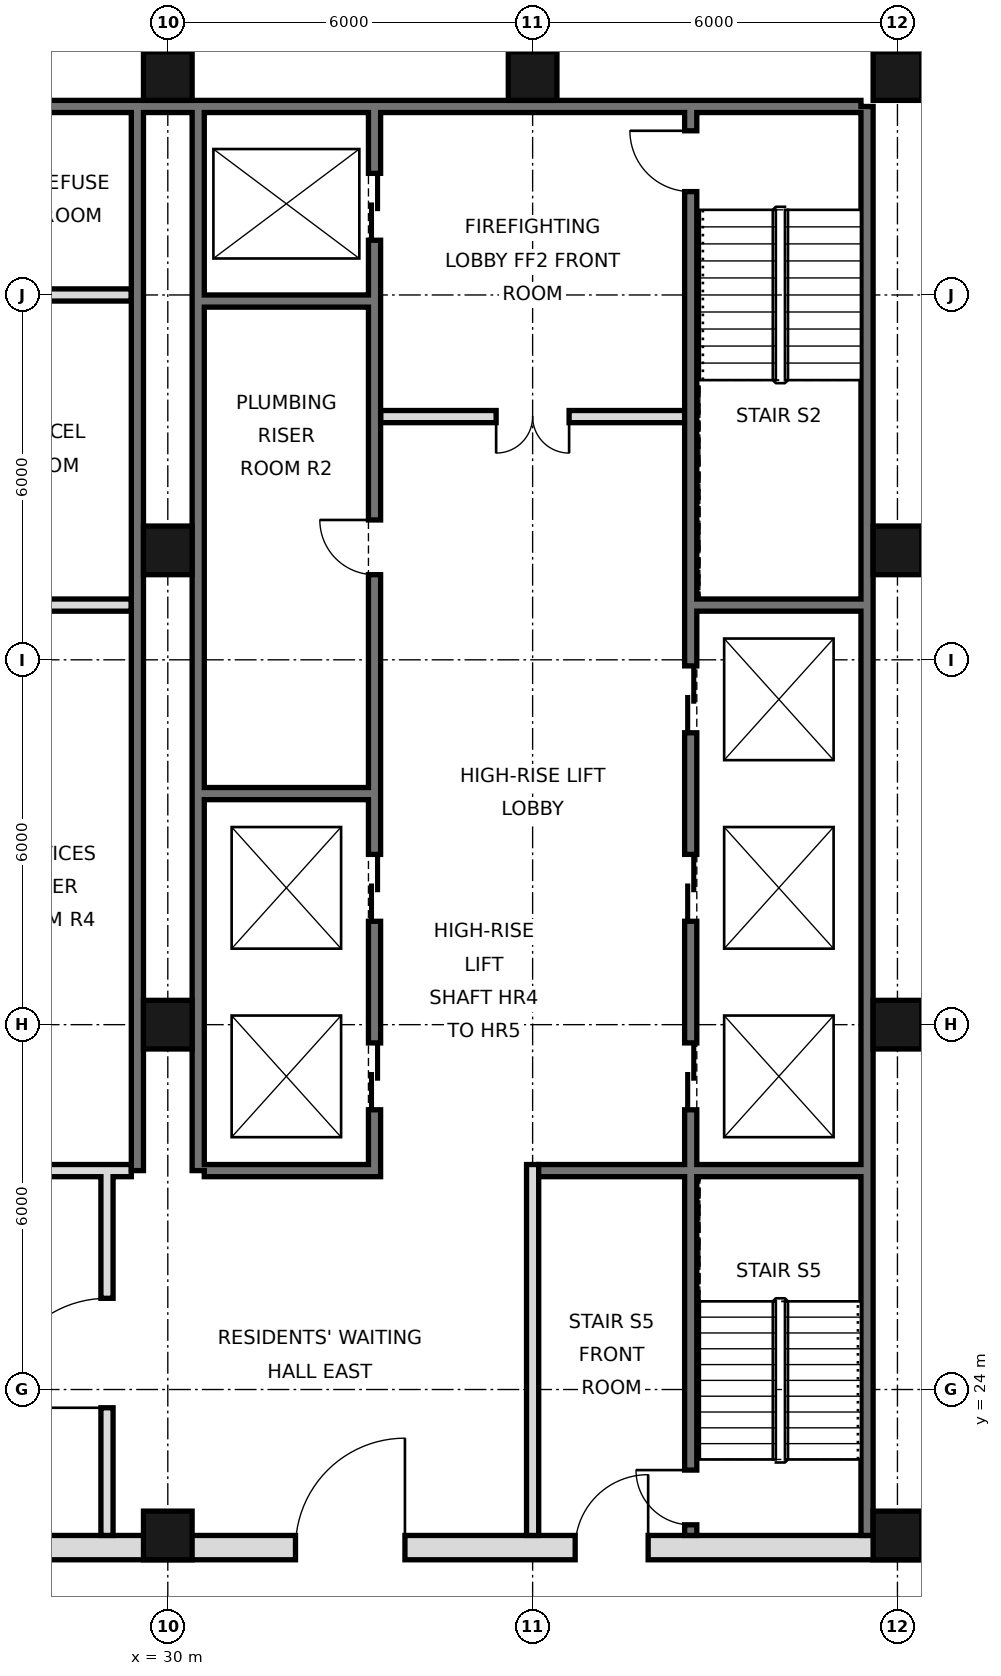
"""IFC4 building model, lengths in metres.
Left out: names, types, materials, properties, quantities, classifications, styles, units other than length and angle.
Written with IfcOpenShell. Run it as: python <this file> out.ifc"""

import sys

from ifc_helpers import new_model, si_unit, direction, frame, frame_2d, origin, origin_2d, place, context, subcontext, project, spatial, rectangle, hollow_rectangle, extrude, element, fill, save


model = new_model("IFC4")
c1 = context("Model", 3, precision=1e-05, world=origin(), true_north=direction((0.0, 1.0)))
c2 = subcontext(c1, "Body", "Model", "MODEL_VIEW")
j1 = project(units=[si_unit("LENGTHUNIT", "METRE"), si_unit("PLANEANGLEUNIT", "RADIAN")], contexts=[c1])
p1 = place(None, origin())
s1 = spatial("IfcSite", under=j1, at=p1, CompositionType="ELEMENT")
p2 = place(p1, origin())
s2 = spatial("IfcBuilding", under=s1, at=p2, CompositionType="ELEMENT")
p3 = place(p2, frame((0.0, 0.0, 312.4)))
s3 = spatial("IfcBuildingStorey", under=s2, at=p3, CompositionType="ELEMENT", Elevation=312.4)
for number, where, z_axis, x_axis in (
    (1, (30.0, 21.6, 0.0), (0.0, 0.0, 1.0), (1.0, 0.0, 0.0)),
    (2, (30.0, 30.0, 0.0), (0.0, 0.0, 1.0), (1.0, 0.0, 0.0)),
    (3, (30.0, 37.8, 0.0), (0.0, 0.0, 1.0), (1.0, 0.0, 0.0)),
    (4, (30.0, 45.6, 0.0), (0.0, 0.0, 1.0), (1.0, 0.0, 0.0)),
    (5, (36.0, 45.6, 0.0), (0.0, 0.0, 1.0), (1.0, 0.0, 0.0)),
    (6, (42.0, 21.6, 0.0), (0.0, 0.0, 1.0), (1.0, 0.0, 0.0)),
    (7, (42.0, 30.0, 0.0), (0.0, 0.0, 1.0), (1.0, 0.0, 0.0)),
    (8, (42.0, 37.8, 0.0), (0.0, 0.0, 1.0), (1.0, 0.0, 0.0)),
    (9, (42.0, 45.6, 0.0), (0.0, 0.0, 1.0), (1.0, 0.0, 0.0)),
):
    element("IfcColumn", number, at=place(p3, frame(where, z_axis=z_axis, x_axis=x_axis)), inside=s3, PredefinedType="COLUMN", context=c2, shape_type="SweptSolid", body=[
        extrude(hollow_rectangle(XDim=0.8, YDim=0.8, WallThickness=0.025, at=origin_2d()), origin(), (0.0, 0.0, 1.0), 3.6),
    ])
p4 = place(p3, frame((41.5, 21.6, 0.0), z_axis=(0.0, 0.0, 1.0), x_axis=(0.0, 1.0, 0.0)))
e10 = element("IfcWall", 10, at=p4, inside=s3, PredefinedType="SOLIDWALL", context=c2, shape_type="SweptSolid", body=[
    extrude(rectangle(XDim=23.5, YDim=0.2, at=frame_2d((11.75, 0.0))), origin(), (0.0, 0.0, 1.0), 3.42),
])
p5 = place(p3, frame((6.6, 45.1, 0.0), z_axis=(0.0, 0.0, 1.0), x_axis=(1.0, 0.0, 0.0)))
e11 = element("IfcWall", 11, at=p5, inside=s3, PredefinedType="SOLIDWALL", context=c2, shape_type="SweptSolid", body=[
    extrude(rectangle(XDim=34.8, YDim=0.2, at=frame_2d((17.4, 0.0))), origin(), (0.0, 0.0, 1.0), 3.42),
])
for number, where, z_axis, x_axis in (
    (12, (29.5, 27.6, 0.0), (0.0, 0.0, 1.0), (0.0, 1.0, 0.0)),
    (13, (30.5, 27.6, 0.0), (0.0, 0.0, 1.0), (0.0, 1.0, 0.0)),
):
    element("IfcWall", number, at=place(p3, frame(where, z_axis=z_axis, x_axis=x_axis)), inside=s3, PredefinedType="SOLIDWALL", context=c2, shape_type="SweptSolid", body=[
        extrude(rectangle(XDim=17.5, YDim=0.2, at=frame_2d((8.75, 0.0))), origin(), (0.0, 0.0, 1.0), 3.42),
    ])
p6 = place(p3, frame((5.6, 21.4, 0.0), z_axis=(0.0, 0.0, 1.0), x_axis=(1.0, 0.0, 0.0)))
e14 = element("IfcWall", 14, at=p6, inside=s3, PredefinedType="SOLIDWALL", context=c2, shape_type="SweptSolid", body=[
    extrude(rectangle(XDim=36.8, YDim=0.4, at=frame_2d((18.4, 0.0))), origin(), (0.0, 0.0, 1.0), 3.42),
])
p7 = place(p6, frame((8.5, 0.0, 0.0)))
e15 = element("IfcOpeningElement", 15, at=p7, cuts=e14, PredefinedType="OPENING", context=c2, shape_type="SweptSolid", body=[
    extrude(rectangle(XDim=1.8, YDim=2.1, at=frame_2d((0.9, 1.05))), frame((0.0, 0.21, 0.0), z_axis=(0.0, -1.0, 0.0), x_axis=(1.0, 0.0, 0.0)), (0.0, 0.0, 1.0), 0.42),
])
p8 = place(p6, frame((17.5, 0.0, 0.0)))
e16 = element("IfcOpeningElement", 16, at=p8, cuts=e14, PredefinedType="OPENING", context=c2, shape_type="SweptSolid", body=[
    extrude(rectangle(XDim=1.8, YDim=2.1, at=frame_2d((0.9, 1.05))), frame((0.0, 0.21, 0.0), z_axis=(0.0, -1.0, 0.0), x_axis=(1.0, 0.0, 0.0)), (0.0, 0.0, 1.0), 0.42),
])
p9 = place(p6, frame((26.5, 0.0, 0.0)))
e17 = element("IfcOpeningElement", 17, at=p9, cuts=e14, PredefinedType="OPENING", context=c2, shape_type="SweptSolid", body=[
    extrude(rectangle(XDim=1.8, YDim=2.1, at=frame_2d((0.9, 1.05))), frame((0.0, 0.21, 0.0), z_axis=(0.0, -1.0, 0.0), x_axis=(1.0, 0.0, 0.0)), (0.0, 0.0, 1.0), 0.42),
])
p10 = place(p6, frame((4.5, 0.0, 0.0)))
e18 = element("IfcOpeningElement", 18, at=p10, cuts=e14, PredefinedType="OPENING", context=c2, shape_type="SweptSolid", body=[
    extrude(rectangle(XDim=1.2, YDim=2.1, at=frame_2d((0.6, 1.05))), frame((0.0, 0.21, 0.0), z_axis=(0.0, -1.0, 0.0), x_axis=(1.0, 0.0, 0.0)), (0.0, 0.0, 1.0), 0.42),
])
p11 = place(p6, frame((31.1, 0.0, 0.0)))
e19 = element("IfcOpeningElement", 19, at=p11, cuts=e14, PredefinedType="OPENING", context=c2, shape_type="SweptSolid", body=[
    extrude(rectangle(XDim=1.2, YDim=2.1, at=frame_2d((0.6, 1.05))), frame((0.0, 0.21, 0.0), z_axis=(0.0, -1.0, 0.0), x_axis=(1.0, 0.0, 0.0)), (0.0, 0.0, 1.0), 0.42),
])
p12 = place(p3, frame((29.0, 21.6, 0.0), z_axis=(0.0, 0.0, 1.0), x_axis=(0.0, 1.0, 0.0)))
e20 = element("IfcWall", 20, at=p12, inside=s3, PredefinedType="PARTITIONING", context=c2, shape_type="SweptSolid", body=[
    extrude(rectangle(XDim=6.0, YDim=0.2, at=frame_2d((3.0, 0.0))), origin(), (0.0, 0.0, 1.0), 3.42),
])
p13 = place(p12, frame((2.1, 0.0, 0.0)))
e21 = element("IfcOpeningElement", 21, at=p13, cuts=e20, PredefinedType="OPENING", context=c2, shape_type="SweptSolid", body=[
    extrude(rectangle(XDim=1.8, YDim=2.1, at=frame_2d((0.9, 1.05))), frame((0.0, 0.11, 0.0), z_axis=(0.0, -1.0, 0.0), x_axis=(1.0, 0.0, 0.0)), (0.0, 0.0, 1.0), 0.22),
])
p14 = place(p3, frame((33.4, 27.5, 0.0), z_axis=(0.0, 0.0, 1.0), x_axis=(0.0, 1.0, 0.0)))
e22 = element("IfcWall", 22, at=p14, inside=s3, PredefinedType="SOLIDWALL", context=c2, shape_type="SweptSolid", body=[
    extrude(rectangle(XDim=17.5, YDim=0.2, at=frame_2d((8.75, 0.0))), origin(), (0.0, 0.0, 1.0), 3.42),
])
p15 = place(p14, frame((1.1, 0.0, 0.0)))
e23 = element("IfcOpeningElement", 23, at=p15, cuts=e22, PredefinedType="OPENING", context=c2, shape_type="SweptSolid", body=[
    extrude(rectangle(XDim=1.1, YDim=2.1, at=frame_2d((0.55, 1.05))), frame((0.0, 0.11, 0.0), z_axis=(0.0, -1.0, 0.0), x_axis=(1.0, 0.0, 0.0)), (0.0, 0.0, 1.0), 0.22),
])
p16 = place(p14, frame((4.2, 0.0, 0.0)))
e24 = element("IfcOpeningElement", 24, at=p16, cuts=e22, PredefinedType="OPENING", context=c2, shape_type="SweptSolid", body=[
    extrude(rectangle(XDim=1.1, YDim=2.1, at=frame_2d((0.55, 1.05))), frame((0.0, 0.11, 0.0), z_axis=(0.0, -1.0, 0.0), x_axis=(1.0, 0.0, 0.0)), (0.0, 0.0, 1.0), 0.22),
])
p17 = place(p14, frame((15.4, 0.0, 0.0)))
e25 = element("IfcOpeningElement", 25, at=p17, cuts=e22, PredefinedType="OPENING", context=c2, shape_type="SweptSolid", body=[
    extrude(rectangle(XDim=1.1, YDim=2.1, at=frame_2d((0.55, 1.05))), frame((0.0, 0.11, 0.0), z_axis=(0.0, -1.0, 0.0), x_axis=(1.0, 0.0, 0.0)), (0.0, 0.0, 1.0), 0.22),
])
p18 = place(p14, frame((9.9, 0.0, 0.0)))
e26 = element("IfcOpeningElement", 26, at=p18, cuts=e22, PredefinedType="OPENING", context=c2, shape_type="SweptSolid", body=[
    extrude(rectangle(XDim=0.9, YDim=2.1, at=frame_2d((0.45, 1.05))), frame((0.0, 0.11, 0.0), z_axis=(0.0, -1.0, 0.0), x_axis=(1.0, 0.0, 0.0)), (0.0, 0.0, 1.0), 0.22),
])
p19 = place(p3, frame((36.0, 21.6, 0.0), z_axis=(0.0, 0.0, 1.0), x_axis=(0.0, 1.0, 0.0)))
e27 = element("IfcWall", 27, at=p19, inside=s3, PredefinedType="PARTITIONING", context=c2, shape_type="SweptSolid", body=[
    extrude(rectangle(XDim=6.1, YDim=0.2, at=frame_2d((3.05, 0.0))), origin(), (0.0, 0.0, 1.0), 3.42),
])
p20 = place(p3, frame((38.6, 21.6, 0.0), z_axis=(0.0, 0.0, 1.0), x_axis=(0.0, 1.0, 0.0)))
e28 = element("IfcWall", 28, at=p20, inside=s3, PredefinedType="SOLIDWALL", context=c2, shape_type="SweptSolid", body=[
    extrude(rectangle(XDim=23.4, YDim=0.2, at=frame_2d((11.7, 0.0))), origin(), (0.0, 0.0, 1.0), 3.42),
])
p21 = place(p20, frame((7.0, 0.0, 0.0)))
e29 = element("IfcOpeningElement", 29, at=p21, cuts=e28, PredefinedType="OPENING", context=c2, shape_type="SweptSolid", body=[
    extrude(rectangle(XDim=1.1, YDim=2.1, at=frame_2d((0.55, 1.05))), frame((0.0, 0.11, 0.0), z_axis=(0.0, -1.0, 0.0), x_axis=(1.0, 0.0, 0.0)), (0.0, 0.0, 1.0), 0.22),
])
p22 = place(p20, frame((10.1, 0.0, 0.0)))
e30 = element("IfcOpeningElement", 30, at=p22, cuts=e28, PredefinedType="OPENING", context=c2, shape_type="SweptSolid", body=[
    extrude(rectangle(XDim=1.1, YDim=2.1, at=frame_2d((0.55, 1.05))), frame((0.0, 0.11, 0.0), z_axis=(0.0, -1.0, 0.0), x_axis=(1.0, 0.0, 0.0)), (0.0, 0.0, 1.0), 0.22),
])
p23 = place(p20, frame((13.2, 0.0, 0.0)))
e31 = element("IfcOpeningElement", 31, at=p23, cuts=e28, PredefinedType="OPENING", context=c2, shape_type="SweptSolid", body=[
    extrude(rectangle(XDim=1.1, YDim=2.1, at=frame_2d((0.55, 1.05))), frame((0.0, 0.11, 0.0), z_axis=(0.0, -1.0, 0.0), x_axis=(1.0, 0.0, 0.0)), (0.0, 0.0, 1.0), 0.22),
])
p24 = place(p20, frame((22.1, 0.0, 0.0)))
e32 = element("IfcOpeningElement", 32, at=p24, cuts=e28, PredefinedType="OPENING", context=c2, shape_type="SweptSolid", body=[
    extrude(rectangle(XDim=1.0, YDim=2.1, at=frame_2d((0.5, 1.05))), frame((0.0, 0.11, 0.0), z_axis=(0.0, -1.0, 0.0), x_axis=(1.0, 0.0, 0.0)), (0.0, 0.0, 1.0), 0.22),
])
p25 = place(p20, frame((0.175, 0.0, 0.0)))
e33 = element("IfcOpeningElement", 33, at=p25, cuts=e28, PredefinedType="OPENING", context=c2, shape_type="SweptSolid", body=[
    extrude(rectangle(XDim=0.9, YDim=2.1, at=frame_2d((0.45, 1.05))), frame((0.0, 0.11, 0.0), z_axis=(0.0, -1.0, 0.0), x_axis=(1.0, 0.0, 0.0)), (0.0, 0.0, 1.0), 0.22),
])
for number, where, z_axis, x_axis in (
    (34, (26.7, 27.6, 0.0), (0.0, 0.0, 1.0), (1.0, 0.0, 0.0)),
    (35, (30.6, 27.6, 0.0), (0.0, 0.0, 1.0), (1.0, 0.0, 0.0)),
):
    element("IfcWall", number, at=place(p3, frame(where, z_axis=z_axis, x_axis=x_axis)), inside=s3, PredefinedType="SOLIDWALL", context=c2, shape_type="SweptSolid", body=[
        extrude(rectangle(XDim=2.7, YDim=0.2, at=frame_2d((1.35, 0.0))), origin(), (0.0, 0.0, 1.0), 3.42),
    ])
p26 = place(p3, frame((36.1, 27.6, 0.0), z_axis=(0.0, 0.0, 1.0), x_axis=(1.0, 0.0, 0.0)))
e36 = element("IfcWall", 36, at=p26, inside=s3, PredefinedType="SOLIDWALL", context=c2, shape_type="SweptSolid", body=[
    extrude(rectangle(XDim=5.3, YDim=0.2, at=frame_2d((2.65, 0.0))), origin(), (0.0, 0.0, 1.0), 3.42),
])
for number, where, z_axis, x_axis in (
    (37, (30.6, 33.8, 0.0), (0.0, 0.0, 1.0), (1.0, 0.0, 0.0)),
    (38, (26.7, 36.9, 0.0), (0.0, 0.0, 1.0), (1.0, 0.0, 0.0)),
    (39, (38.7, 36.9, 0.0), (0.0, 0.0, 1.0), (1.0, 0.0, 0.0)),
):
    element("IfcWall", number, at=place(p3, frame(where, z_axis=z_axis, x_axis=x_axis)), inside=s3, PredefinedType="SOLIDWALL", context=c2, shape_type="SweptSolid", body=[
        extrude(rectangle(XDim=2.7, YDim=0.2, at=frame_2d((1.35, 0.0))), origin(), (0.0, 0.0, 1.0), 3.42),
    ])
p27 = place(p3, frame((33.5, 40.0, 0.0), z_axis=(0.0, 0.0, 1.0), x_axis=(1.0, 0.0, 0.0)))
e40 = element("IfcWall", 40, at=p27, inside=s3, PredefinedType="PARTITIONING", context=c2, shape_type="SweptSolid", body=[
    extrude(rectangle(XDim=5.0, YDim=0.2, at=frame_2d((2.5, 0.0))), origin(), (0.0, 0.0, 1.0), 3.42),
])
p28 = place(p27, frame((1.9, 0.0, 0.0)))
e41 = element("IfcOpeningElement", 41, at=p28, cuts=e40, PredefinedType="OPENING", context=c2, shape_type="SweptSolid", body=[
    extrude(rectangle(XDim=1.2, YDim=2.1, at=frame_2d((0.6, 1.05))), frame((0.0, 0.11, 0.0), z_axis=(0.0, -1.0, 0.0), x_axis=(1.0, 0.0, 0.0)), (0.0, 0.0, 1.0), 0.22),
])
p29 = place(p3, frame((30.6, 41.9, 0.0), z_axis=(0.0, 0.0, 1.0), x_axis=(1.0, 0.0, 0.0)))
e42 = element("IfcWall", 42, at=p29, inside=s3, PredefinedType="SOLIDWALL", context=c2, shape_type="SweptSolid", body=[
    extrude(rectangle(XDim=2.7, YDim=0.2, at=frame_2d((1.35, 0.0))), origin(), (0.0, 0.0, 1.0), 3.42),
])
p30 = place(p3, frame((26.7, 42.0, 0.0), z_axis=(0.0, 0.0, 1.0), x_axis=(1.0, 0.0, 0.0)))
e43 = element("IfcWall", 43, at=p30, inside=s3, PredefinedType="PARTITIONING", context=c2, shape_type="SweptSolid", body=[
    extrude(rectangle(XDim=2.7, YDim=0.2, at=frame_2d((1.35, 0.0))), origin(), (0.0, 0.0, 1.0), 3.42),
])
p31 = place(p13, origin())
e44 = element("IfcDoor", 44, at=p31, inside=s3, OperationType="SINGLE_SWING_LEFT", PredefinedType="DOOR", context=c2, shape_type="SweptSolid", body=[
    extrude(rectangle(XDim=1.8, YDim=2.1, at=frame_2d((0.9, 1.05))), frame((0.0, 0.025, 0.0), z_axis=(0.0, -1.0, 0.0), x_axis=(1.0, 0.0, 0.0)), (0.0, 0.0, 1.0), 0.05),
])
fill(e21, e44)
p32 = place(p9, frame((1.8, 0.0, 0.0), z_axis=(0.0, 0.0, 1.0), x_axis=(-1.0, 0.0, 0.0)))
e45 = element("IfcDoor", 45, at=p32, inside=s3, OperationType="SINGLE_SWING_LEFT", PredefinedType="DOOR", context=c2, shape_type="SweptSolid", body=[
    extrude(rectangle(XDim=1.8, YDim=2.1, at=frame_2d((0.9, 1.05))), frame((0.0, 0.025, 0.0), z_axis=(0.0, -1.0, 0.0), x_axis=(1.0, 0.0, 0.0)), (0.0, 0.0, 1.0), 0.05),
])
fill(e17, e45)
p33 = place(p11, frame((1.2, 0.0, 0.0), z_axis=(0.0, 0.0, 1.0), x_axis=(-1.0, 0.0, 0.0)))
e46 = element("IfcDoor", 46, at=p33, inside=s3, OperationType="SINGLE_SWING_LEFT", PredefinedType="DOOR", context=c2, shape_type="SweptSolid", body=[
    extrude(rectangle(XDim=1.2, YDim=2.1, at=frame_2d((0.6, 1.05))), frame((0.0, 0.025, 0.0), z_axis=(0.0, -1.0, 0.0), x_axis=(1.0, 0.0, 0.0)), (0.0, 0.0, 1.0), 0.05),
])
fill(e19, e46)
p34 = place(p28, frame((1.2, 0.0, 0.0), z_axis=(0.0, 0.0, 1.0), x_axis=(-1.0, 0.0, 0.0)))
e47 = element("IfcDoor", 47, at=p34, inside=s3, OperationType="DOUBLE_DOOR_SINGLE_SWING", PredefinedType="DOOR", context=c2, shape_type="SweptSolid", body=[
    extrude(rectangle(XDim=1.2, YDim=2.1, at=frame_2d((0.6, 1.05))), frame((0.0, 0.025, 0.0), z_axis=(0.0, -1.0, 0.0), x_axis=(1.0, 0.0, 0.0)), (0.0, 0.0, 1.0), 0.05),
])
fill(e41, e47)
p35 = place(p21, origin())
e48 = element("IfcDoor", 48, at=p35, inside=s3, OperationType="DOUBLE_DOOR_SLIDING", PredefinedType="DOOR", context=c2, shape_type="SweptSolid", body=[
    extrude(rectangle(XDim=1.1, YDim=2.1, at=frame_2d((0.55, 1.05))), frame((0.0, 0.025, 0.0), z_axis=(0.0, -1.0, 0.0), x_axis=(1.0, 0.0, 0.0)), (0.0, 0.0, 1.0), 0.05),
])
fill(e29, e48)
p36 = place(p22, origin())
e49 = element("IfcDoor", 49, at=p36, inside=s3, OperationType="DOUBLE_DOOR_SLIDING", PredefinedType="DOOR", context=c2, shape_type="SweptSolid", body=[
    extrude(rectangle(XDim=1.1, YDim=2.1, at=frame_2d((0.55, 1.05))), frame((0.0, 0.025, 0.0), z_axis=(0.0, -1.0, 0.0), x_axis=(1.0, 0.0, 0.0)), (0.0, 0.0, 1.0), 0.05),
])
fill(e30, e49)
p37 = place(p23, origin())
e50 = element("IfcDoor", 50, at=p37, inside=s3, OperationType="DOUBLE_DOOR_SLIDING", PredefinedType="DOOR", context=c2, shape_type="SweptSolid", body=[
    extrude(rectangle(XDim=1.1, YDim=2.1, at=frame_2d((0.55, 1.05))), frame((0.0, 0.025, 0.0), z_axis=(0.0, -1.0, 0.0), x_axis=(1.0, 0.0, 0.0)), (0.0, 0.0, 1.0), 0.05),
])
fill(e31, e50)
p38 = place(p15, origin())
e51 = element("IfcDoor", 51, at=p38, inside=s3, OperationType="DOUBLE_DOOR_SLIDING", PredefinedType="DOOR", context=c2, shape_type="SweptSolid", body=[
    extrude(rectangle(XDim=1.1, YDim=2.1, at=frame_2d((0.55, 1.05))), frame((0.0, 0.025, 0.0), z_axis=(0.0, -1.0, 0.0), x_axis=(1.0, 0.0, 0.0)), (0.0, 0.0, 1.0), 0.05),
])
fill(e23, e51)
p39 = place(p16, origin())
e52 = element("IfcDoor", 52, at=p39, inside=s3, OperationType="DOUBLE_DOOR_SLIDING", PredefinedType="DOOR", context=c2, shape_type="SweptSolid", body=[
    extrude(rectangle(XDim=1.1, YDim=2.1, at=frame_2d((0.55, 1.05))), frame((0.0, 0.025, 0.0), z_axis=(0.0, -1.0, 0.0), x_axis=(1.0, 0.0, 0.0)), (0.0, 0.0, 1.0), 0.05),
])
fill(e24, e52)
p40 = place(p17, origin())
e53 = element("IfcDoor", 53, at=p40, inside=s3, OperationType="DOUBLE_DOOR_SLIDING", PredefinedType="DOOR", context=c2, shape_type="SweptSolid", body=[
    extrude(rectangle(XDim=1.1, YDim=2.1, at=frame_2d((0.55, 1.05))), frame((0.0, 0.025, 0.0), z_axis=(0.0, -1.0, 0.0), x_axis=(1.0, 0.0, 0.0)), (0.0, 0.0, 1.0), 0.05),
])
fill(e25, e53)
p41 = place(p24, frame((1.0, 0.0, 0.0), z_axis=(0.0, 0.0, 1.0), x_axis=(-1.0, 0.0, 0.0)))
e54 = element("IfcDoor", 54, at=p41, inside=s3, OperationType="SINGLE_SWING_LEFT", PredefinedType="DOOR", context=c2, shape_type="SweptSolid", body=[
    extrude(rectangle(XDim=1.0, YDim=2.1, at=frame_2d((0.5, 1.05))), frame((0.0, 0.025, 0.0), z_axis=(0.0, -1.0, 0.0), x_axis=(1.0, 0.0, 0.0)), (0.0, 0.0, 1.0), 0.05),
])
fill(e32, e54)
p42 = place(p25, frame((0.9, 0.0, 0.0), z_axis=(0.0, 0.0, 1.0), x_axis=(-1.0, 0.0, 0.0)))
e55 = element("IfcDoor", 55, at=p42, inside=s3, OperationType="SINGLE_SWING_LEFT", PredefinedType="DOOR", context=c2, shape_type="SweptSolid", body=[
    extrude(rectangle(XDim=0.9, YDim=2.1, at=frame_2d((0.45, 1.05))), frame((0.0, 0.025, 0.0), z_axis=(0.0, -1.0, 0.0), x_axis=(1.0, 0.0, 0.0)), (0.0, 0.0, 1.0), 0.05),
])
fill(e33, e55)
p43 = place(p18, frame((0.9, 0.0, 0.0), z_axis=(0.0, 0.0, 1.0), x_axis=(-1.0, 0.0, 0.0)))
e56 = element("IfcDoor", 56, at=p43, inside=s3, OperationType="SINGLE_SWING_LEFT", PredefinedType="DOOR", context=c2, shape_type="SweptSolid", body=[
    extrude(rectangle(XDim=0.9, YDim=2.1, at=frame_2d((0.45, 1.05))), frame((0.0, 0.025, 0.0), z_axis=(0.0, -1.0, 0.0), x_axis=(1.0, 0.0, 0.0)), (0.0, 0.0, 1.0), 0.05),
])
fill(e26, e56)
save(model, sys.argv[1])
